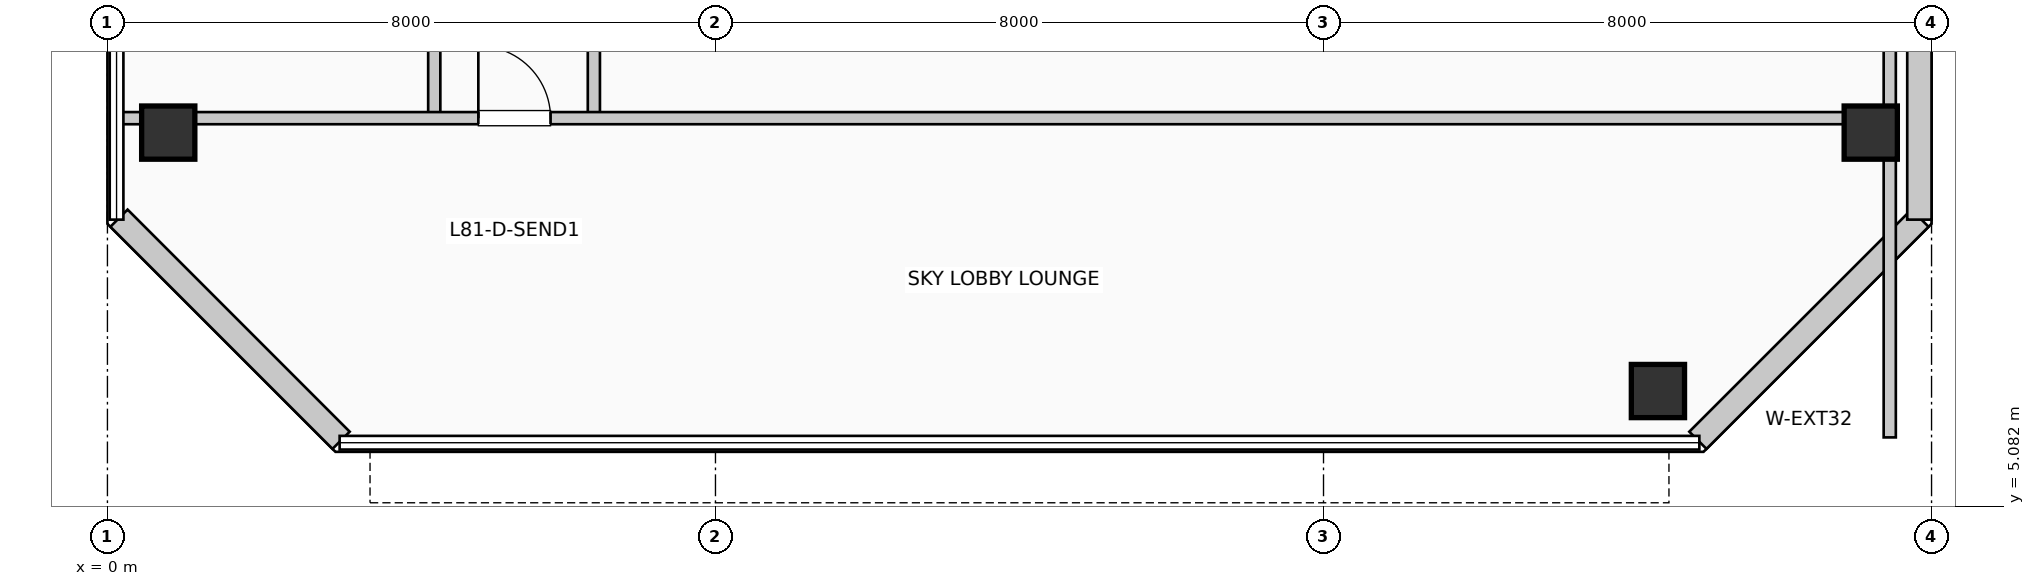
"""IFC4 building model, lengths in metres.
Left out: names, types, materials, properties, quantities, classifications, styles, units other than length and angle.
Written with IfcOpenShell. Run it as: python <this file> out.ifc"""

import sys

from ifc_helpers import new_model, si_unit, direction, frame, frame_2d, origin, origin_2d, place, context, subcontext, project, spatial, rectangle, extrude, element, fill, save


model = new_model("IFC4")
c1 = context("Model", 3, precision=1e-05, world=origin(), true_north=direction((0.0, 1.0)))
c2 = subcontext(c1, "Body", "Model", "MODEL_VIEW")
j1 = project(units=[si_unit("LENGTHUNIT", "METRE"), si_unit("PLANEANGLEUNIT", "RADIAN")], contexts=[c1])
p1 = place(None, origin())
s1 = spatial("IfcSite", under=j1, at=p1, CompositionType="ELEMENT")
p2 = place(p1, origin())
s2 = spatial("IfcBuilding", under=s1, at=p2, CompositionType="ELEMENT")
p3 = place(p2, frame((0.0, 0.0, 331.65)))
s3 = spatial("IfcBuildingStorey", under=s2, at=p3, CompositionType="ELEMENT", Elevation=331.65)
for number, where, z_axis, x_axis in (
    (1, (0.8, 10.0, 0.0), (0.0, 0.0, 1.0), (1.0, 0.0, 0.0)),
    (2, (20.4, 6.6, 0.0), (0.0, 0.0, 1.0), (1.0, 0.0, 0.0)),
    (3, (23.2, 10.0, 0.0), (0.0, 0.0, 1.0), (1.0, 0.0, 0.0)),
):
    element("IfcColumn", number, at=place(p3, frame(where, z_axis=z_axis, x_axis=x_axis)), inside=s3, PredefinedType="COLUMN", context=c2, shape_type="SweptSolid", body=[
        extrude(rectangle(XDim=0.7, YDim=0.7, at=origin_2d()), origin(), (0.0, 0.0, 1.0), 3.96),
    ])
p4 = place(p3, frame((20.926, 5.952, 0.0), z_axis=(0.0, 0.0, 1.0), x_axis=(0.707077242712, 0.707136318428, 0.0)))
e4 = element("IfcWall", 4, at=p4, inside=s3, PredefinedType="SOLIDWALL", context=c2, shape_type="SweptSolid", body=[
    extrude(rectangle(XDim=4.133, YDim=0.32, at=frame_2d((2.066, 0.0))), origin(), (0.0, 0.0, 1.0), 3.74),
])
p5 = place(p3, frame((23.84, 8.855, 0.0), z_axis=(0.0, 0.0, 1.0), x_axis=(0.0, 1.0, 0.0)))
e5 = element("IfcWall", 5, at=p5, inside=s3, PredefinedType="SOLIDWALL", context=c2, shape_type="SweptSolid", body=[
    extrude(rectangle(XDim=14.09, YDim=0.32, at=frame_2d((7.045, 0.0))), origin(), (0.0, 0.0, 1.0), 3.74),
])
p6 = place(p3, frame((0.152, 8.874, 0.0), z_axis=(0.0, 0.0, 1.0), x_axis=(0.707077242712, -0.707136318428, 0.0)))
e6 = element("IfcWall", 6, at=p6, inside=s3, PredefinedType="SOLIDWALL", context=c2, shape_type="SweptSolid", body=[
    extrude(rectangle(XDim=4.133, YDim=0.32, at=frame_2d((2.066, 0.0))), origin(), (0.0, 0.0, 1.0), 3.74),
])
p7 = place(p3, frame((4.3, 10.19, 0.0), z_axis=(0.0, 0.0, 1.0), x_axis=(0.0, 1.0, 0.0)))
e7 = element("IfcWall", 7, at=p7, inside=s3, PredefinedType="PARTITIONING", context=c2, shape_type="SweptSolid", body=[
    extrude(rectangle(XDim=19.21, YDim=0.16, at=frame_2d((9.605, 0.0))), origin(), (0.0, 0.0, 1.0), 3.74),
])
p8 = place(p7, frame((5.085, 0.0, 0.0), z_axis=(0.0, 0.0, 1.0), x_axis=(-1.0, 0.0, 0.0)))
e8 = element("IfcOpeningElement", 8, at=p8, cuts=e7, PredefinedType="OPENING", context=c2, shape_type="SweptSolid", body=[
    extrude(rectangle(XDim=0.95, YDim=2.15, at=frame_2d((0.475, 1.075))), frame((0.0, 0.09, 0.0), z_axis=(0.0, -1.0, 0.0), x_axis=(1.0, 0.0, 0.0)), (0.0, 0.0, 1.0), 0.18),
])
p9 = place(p7, frame((14.69, 0.0, 0.0), z_axis=(0.0, 0.0, 1.0), x_axis=(-1.0, 0.0, 0.0)))
e9 = element("IfcOpeningElement", 9, at=p9, cuts=e7, PredefinedType="OPENING", context=c2, shape_type="SweptSolid", body=[
    extrude(rectangle(XDim=0.95, YDim=2.15, at=frame_2d((0.475, 1.075))), frame((0.0, 0.09, 0.0), z_axis=(0.0, -1.0, 0.0), x_axis=(1.0, 0.0, 0.0)), (0.0, 0.0, 1.0), 0.18),
])
p10 = place(p3, frame((6.4, 10.19, 0.0), z_axis=(0.0, 0.0, 1.0), x_axis=(0.0, 1.0, 0.0)))
e10 = element("IfcWall", 10, at=p10, inside=s3, PredefinedType="PARTITIONING", context=c2, shape_type="SweptSolid", body=[
    extrude(rectangle(XDim=19.21, YDim=0.16, at=frame_2d((9.605, 0.0))), origin(), (0.0, 0.0, 1.0), 3.74),
])
p11 = place(p10, frame((1.35, 0.0, 0.0)))
e11 = element("IfcOpeningElement", 11, at=p11, cuts=e10, PredefinedType="OPENING", context=c2, shape_type="SweptSolid", body=[
    extrude(rectangle(XDim=0.95, YDim=2.15, at=frame_2d((0.475, 1.075))), frame((0.0, 0.09, 0.0), z_axis=(0.0, -1.0, 0.0), x_axis=(1.0, 0.0, 0.0)), (0.0, 0.0, 1.0), 0.18),
])
p12 = place(p10, frame((5.096, 0.0, 0.0)))
e12 = element("IfcOpeningElement", 12, at=p12, cuts=e10, PredefinedType="OPENING", context=c2, shape_type="SweptSolid", body=[
    extrude(rectangle(XDim=0.95, YDim=2.15, at=frame_2d((0.475, 1.075))), frame((0.0, 0.09, 0.0), z_axis=(0.0, -1.0, 0.0), x_axis=(1.0, 0.0, 0.0)), (0.0, 0.0, 1.0), 0.18),
])
p13 = place(p10, frame((9.034, 0.0, 0.0)))
e13 = element("IfcOpeningElement", 13, at=p13, cuts=e10, PredefinedType="OPENING", context=c2, shape_type="SweptSolid", body=[
    extrude(rectangle(XDim=0.95, YDim=2.15, at=frame_2d((0.475, 1.075))), frame((0.0, 0.09, 0.0), z_axis=(0.0, -1.0, 0.0), x_axis=(1.0, 0.0, 0.0)), (0.0, 0.0, 1.0), 0.18),
])
p14 = place(p10, frame((12.972, 0.0, 0.0)))
e14 = element("IfcOpeningElement", 14, at=p14, cuts=e10, PredefinedType="OPENING", context=c2, shape_type="SweptSolid", body=[
    extrude(rectangle(XDim=0.95, YDim=2.15, at=frame_2d((0.475, 1.075))), frame((0.0, 0.09, 0.0), z_axis=(0.0, -1.0, 0.0), x_axis=(1.0, 0.0, 0.0)), (0.0, 0.0, 1.0), 0.18),
])
p15 = place(p10, frame((16.814, 0.0, 0.0)))
e15 = element("IfcOpeningElement", 15, at=p15, cuts=e10, PredefinedType="OPENING", context=c2, shape_type="SweptSolid", body=[
    extrude(rectangle(XDim=0.95, YDim=2.15, at=frame_2d((0.475, 1.075))), frame((0.0, 0.09, 0.0), z_axis=(0.0, -1.0, 0.0), x_axis=(1.0, 0.0, 0.0)), (0.0, 0.0, 1.0), 0.18),
])
p16 = place(p3, frame((0.19, 10.19, 0.0), z_axis=(0.0, 0.0, 1.0), x_axis=(1.0, 0.0, 0.0)))
e16 = element("IfcWall", 16, at=p16, inside=s3, PredefinedType="PARTITIONING", context=c2, shape_type="SweptSolid", body=[
    extrude(rectangle(XDim=23.26, YDim=0.16, at=frame_2d((11.63, 0.0))), origin(), (0.0, 0.0, 1.0), 3.175),
])
p17 = place(p16, frame((4.69, 0.0, 0.0)))
e17 = element("IfcOpeningElement", 17, at=p17, cuts=e16, PredefinedType="OPENING", context=c2, shape_type="SweptSolid", body=[
    extrude(rectangle(XDim=0.95, YDim=2.15, at=frame_2d((0.475, 1.075))), frame((0.0, 0.09, 0.0), z_axis=(0.0, -1.0, 0.0), x_axis=(1.0, 0.0, 0.0)), (0.0, 0.0, 1.0), 0.18),
])
p18 = place(p3, frame((23.45, 5.99, 0.0), z_axis=(0.0, 0.0, 1.0), x_axis=(0.0, 1.0, 0.0)))
e18 = element("IfcWall", 18, at=p18, inside=s3, PredefinedType="PARTITIONING", context=c2, shape_type="SweptSolid", body=[
    extrude(rectangle(XDim=23.41, YDim=0.16, at=frame_2d((11.705, 0.0))), origin(), (0.0, 0.0, 1.0), 3.175),
])
p19 = place(p17, origin())
e19 = element("IfcDoor", 19, at=p19, inside=s3, OperationType="SINGLE_SWING_LEFT", PredefinedType="DOOR", context=c2, shape_type="SweptSolid", body=[
    extrude(rectangle(XDim=0.95, YDim=2.15, at=frame_2d((0.475, 1.075))), frame((0.0, 0.025, 0.0), z_axis=(0.0, -1.0, 0.0), x_axis=(1.0, 0.0, 0.0)), (0.0, 0.0, 1.0), 0.05),
])
fill(e17, e19)
save(model, sys.argv[1])
